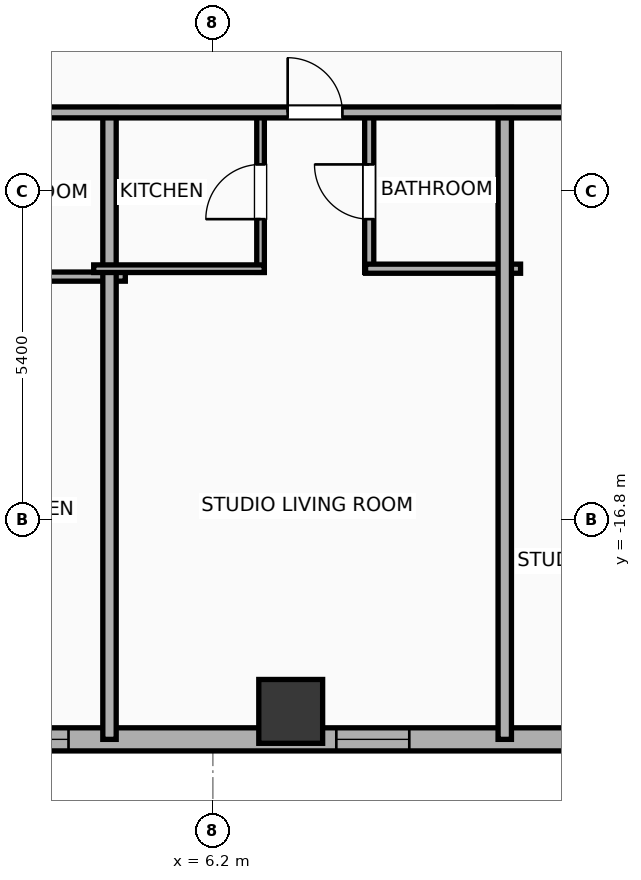
"""IFC4 building model, lengths in metres.
Left out: names, types, materials, properties, quantities, classifications, styles, units other than length and angle.
Written with IfcOpenShell. Run it as: python <this file> out.ifc"""

import sys

from ifc_helpers import new_model, si_unit, direction, frame, frame_2d, origin, origin_2d, place, context, subcontext, project, spatial, rectangle, hollow_rectangle, extrude, element, fill, save


model = new_model("IFC4")
c1 = context("Model", 3, precision=1e-05, world=origin(), true_north=direction((0.0, 1.0)))
c2 = subcontext(c1, "Body", "Model", "MODEL_VIEW")
j1 = project(units=[si_unit("LENGTHUNIT", "METRE"), si_unit("PLANEANGLEUNIT", "RADIAN")], contexts=[c1])
p1 = place(None, origin())
s1 = spatial("IfcSite", under=j1, at=p1, CompositionType="ELEMENT")
p2 = place(p1, origin())
s2 = spatial("IfcBuilding", under=s1, at=p2, CompositionType="ELEMENT")
p3 = place(p2, frame((0.0, 0.0, 128.7)))
s3 = spatial("IfcBuildingStorey", under=s2, at=p3, CompositionType="ELEMENT", Elevation=128.7)
p4 = place(p3, frame((7.48, -19.95, 0.0), z_axis=(0.0, 0.0, 1.0), x_axis=(1.0, 0.0, 0.0)))
e1 = element("IfcColumn", 1, at=p4, inside=s3, PredefinedType="COLUMN", context=c2, shape_type="SweptSolid", body=[
    extrude(hollow_rectangle(XDim=1.05, YDim=1.05, WallThickness=0.036, at=origin_2d()), origin(), (0.0, 0.0, 1.0), 3.9),
])
p5 = place(p3, frame((29.381, -20.41, 0.0), z_axis=(0.0, 0.0, 1.0), x_axis=(-1.0, 0.0, 0.0)))
e2 = element("IfcWall", 2, at=p5, inside=s3, PredefinedType="ELEMENTEDWALL", context=c2, shape_type="SweptSolid", body=[
    extrude(rectangle(XDim=54.763, YDim=0.38, at=frame_2d((27.381, 0.0))), origin(), (0.0, 0.0, 1.0), 3.65),
])
p6 = place(p5, frame((45.067, 0.0, 0.75)))
e3 = element("IfcOpeningElement", 3, at=p6, cuts=e2, PredefinedType="OPENING", context=c2, shape_type="SweptSolid", body=[
    extrude(rectangle(XDim=2.4, YDim=2.1, at=frame_2d((1.2, 1.05))), frame((0.0, 0.2, 0.0), z_axis=(0.0, -1.0, 0.0), x_axis=(1.0, 0.0, 0.0)), (0.0, 0.0, 1.0), 0.4),
])
p7 = place(p5, frame((51.777, 0.0, 0.75)))
e4 = element("IfcOpeningElement", 4, at=p7, cuts=e2, PredefinedType="OPENING", context=c2, shape_type="SweptSolid", body=[
    extrude(rectangle(XDim=1.2, YDim=2.05, at=frame_2d((0.6, 1.025))), frame((0.0, 0.2, 0.0), z_axis=(0.0, -1.0, 0.0), x_axis=(1.0, 0.0, 0.0)), (0.0, 0.0, 1.0), 0.4),
])
p8 = place(p5, frame((48.976, 0.0, 0.75)))
e5 = element("IfcOpeningElement", 5, at=p8, cuts=e2, PredefinedType="OPENING", context=c2, shape_type="SweptSolid", body=[
    extrude(rectangle(XDim=1.2, YDim=2.05, at=frame_2d((0.6, 1.025))), frame((0.0, 0.2, 0.0), z_axis=(0.0, -1.0, 0.0), x_axis=(1.0, 0.0, 0.0)), (0.0, 0.0, 1.0), 0.4),
])
p9 = place(p5, frame((40.531, 0.0, 0.75)))
e6 = element("IfcOpeningElement", 6, at=p9, cuts=e2, PredefinedType="OPENING", context=c2, shape_type="SweptSolid", body=[
    extrude(rectangle(XDim=1.2, YDim=2.05, at=frame_2d((0.6, 1.025))), frame((0.0, 0.2, 0.0), z_axis=(0.0, -1.0, 0.0), x_axis=(1.0, 0.0, 0.0)), (0.0, 0.0, 1.0), 0.4),
])
p10 = place(p5, frame((33.686, 0.0, 0.75)))
e7 = element("IfcOpeningElement", 7, at=p10, cuts=e2, PredefinedType="OPENING", context=c2, shape_type="SweptSolid", body=[
    extrude(rectangle(XDim=1.2, YDim=2.05, at=frame_2d((0.6, 1.025))), frame((0.0, 0.2, 0.0), z_axis=(0.0, -1.0, 0.0), x_axis=(1.0, 0.0, 0.0)), (0.0, 0.0, 1.0), 0.4),
])
p11 = place(p5, frame((35.976, 0.0, 0.75)))
e8 = element("IfcOpeningElement", 8, at=p11, cuts=e2, PredefinedType="OPENING", context=c2, shape_type="SweptSolid", body=[
    extrude(rectangle(XDim=1.2, YDim=2.05, at=frame_2d((0.6, 1.025))), frame((0.0, 0.2, 0.0), z_axis=(0.0, -1.0, 0.0), x_axis=(1.0, 0.0, 0.0)), (0.0, 0.0, 1.0), 0.4),
])
p12 = place(p5, frame((28.805, 0.0, 0.75)))
e9 = element("IfcOpeningElement", 9, at=p12, cuts=e2, PredefinedType="OPENING", context=c2, shape_type="SweptSolid", body=[
    extrude(rectangle(XDim=1.2, YDim=2.05, at=frame_2d((0.6, 1.025))), frame((0.0, 0.2, 0.0), z_axis=(0.0, -1.0, 0.0), x_axis=(1.0, 0.0, 0.0)), (0.0, 0.0, 1.0), 0.4),
])
p13 = place(p5, frame((25.555, 0.0, 0.75)))
e10 = element("IfcOpeningElement", 10, at=p13, cuts=e2, PredefinedType="OPENING", context=c2, shape_type="SweptSolid", body=[
    extrude(rectangle(XDim=1.2, YDim=2.05, at=frame_2d((0.6, 1.025))), frame((0.0, 0.2, 0.0), z_axis=(0.0, -1.0, 0.0), x_axis=(1.0, 0.0, 0.0)), (0.0, 0.0, 1.0), 0.4),
])
p14 = place(p5, frame((19.951, 0.0, 0.75)))
e11 = element("IfcOpeningElement", 11, at=p14, cuts=e2, PredefinedType="OPENING", context=c2, shape_type="SweptSolid", body=[
    extrude(rectangle(XDim=1.2, YDim=2.05, at=frame_2d((0.6, 1.025))), frame((0.0, 0.2, 0.0), z_axis=(0.0, -1.0, 0.0), x_axis=(1.0, 0.0, 0.0)), (0.0, 0.0, 1.0), 0.4),
])
p15 = place(p5, frame((15.836, 0.0, 0.75)))
e12 = element("IfcOpeningElement", 12, at=p15, cuts=e2, PredefinedType="OPENING", context=c2, shape_type="SweptSolid", body=[
    extrude(rectangle(XDim=1.2, YDim=2.05, at=frame_2d((0.6, 1.025))), frame((0.0, 0.2, 0.0), z_axis=(0.0, -1.0, 0.0), x_axis=(1.0, 0.0, 0.0)), (0.0, 0.0, 1.0), 0.4),
])
p16 = place(p5, frame((12.586, 0.0, 0.75)))
e13 = element("IfcOpeningElement", 13, at=p16, cuts=e2, PredefinedType="OPENING", context=c2, shape_type="SweptSolid", body=[
    extrude(rectangle(XDim=1.2, YDim=2.05, at=frame_2d((0.6, 1.025))), frame((0.0, 0.2, 0.0), z_axis=(0.0, -1.0, 0.0), x_axis=(1.0, 0.0, 0.0)), (0.0, 0.0, 1.0), 0.4),
])
p17 = place(p5, frame((9.011, 0.0, 0.75)))
e14 = element("IfcOpeningElement", 14, at=p17, cuts=e2, PredefinedType="OPENING", context=c2, shape_type="SweptSolid", body=[
    extrude(rectangle(XDim=1.2, YDim=2.05, at=frame_2d((0.6, 1.025))), frame((0.0, 0.2, 0.0), z_axis=(0.0, -1.0, 0.0), x_axis=(1.0, 0.0, 0.0)), (0.0, 0.0, 1.0), 0.4),
])
p18 = place(p5, frame((6.001, 0.0, 0.75)))
e15 = element("IfcOpeningElement", 15, at=p18, cuts=e2, PredefinedType="OPENING", context=c2, shape_type="SweptSolid", body=[
    extrude(rectangle(XDim=1.2, YDim=2.05, at=frame_2d((0.6, 1.025))), frame((0.0, 0.2, 0.0), z_axis=(0.0, -1.0, 0.0), x_axis=(1.0, 0.0, 0.0)), (0.0, 0.0, 1.0), 0.4),
])
p19 = place(p5, frame((2.536, 0.0, 0.75)))
e16 = element("IfcOpeningElement", 16, at=p19, cuts=e2, PredefinedType="OPENING", context=c2, shape_type="SweptSolid", body=[
    extrude(rectangle(XDim=1.2, YDim=2.05, at=frame_2d((0.6, 1.025))), frame((0.0, 0.2, 0.0), z_axis=(0.0, -1.0, 0.0), x_axis=(1.0, 0.0, 0.0)), (0.0, 0.0, 1.0), 0.4),
])
p20 = place(p3, frame((1.872, -12.8, 0.0), z_axis=(0.0, 0.0, 1.0), x_axis=(1.0, 0.0, 0.0)))
e17 = element("IfcWall", 17, at=p20, inside=s3, PredefinedType="PLUMBINGWALL", context=c2, shape_type="SweptSolid", body=[
    extrude(rectangle(XDim=2.888, YDim=0.15, at=frame_2d((1.444, 0.0))), origin(), (0.0, 0.0, 1.0), 3.65),
])
p21 = place(p3, frame((4.5, -20.41, 0.0), z_axis=(0.0, 0.0, 1.0), x_axis=(0.0, 1.0, 0.0)))
e18 = element("IfcWall", 18, at=p21, inside=s3, PredefinedType="PARTITIONING", context=c2, shape_type="SweptSolid", body=[
    extrude(rectangle(XDim=10.39, YDim=0.22, at=frame_2d((5.195, 0.0))), origin(), (0.0, 0.0, 1.0), 3.65),
])
p22 = place(p3, frame((6.984, -12.73, 0.0), z_axis=(0.0, 0.0, 1.0), x_axis=(0.0, 1.0, 0.0)))
e19 = element("IfcWall", 19, at=p22, inside=s3, PredefinedType="PARTITIONING", context=c2, shape_type="SweptSolid", body=[
    extrude(rectangle(XDim=2.65, YDim=0.125, at=frame_2d((1.325, 0.0))), origin(), (0.0, 0.0, 1.0), 3.65),
])
p23 = place(p22, frame((0.875, 0.0, 0.0)))
e20 = element("IfcOpeningElement", 20, at=p23, cuts=e19, PredefinedType="OPENING", context=c2, shape_type="SweptSolid", body=[
    extrude(rectangle(XDim=0.9, YDim=2.05, at=frame_2d((0.45, 1.025))), frame((0.0, 0.073, 0.0), z_axis=(0.0, -1.0, 0.0), x_axis=(1.0, 0.0, 0.0)), (0.0, 0.0, 1.0), 0.145),
])
p24 = place(p3, frame((8.771, -12.73, 0.0), z_axis=(0.0, 0.0, 1.0), x_axis=(0.0, 1.0, 0.0)))
e21 = element("IfcWall", 21, at=p24, inside=s3, PredefinedType="PLUMBINGWALL", context=c2, shape_type="SweptSolid", body=[
    extrude(rectangle(XDim=2.65, YDim=0.15, at=frame_2d((1.325, 0.0))), origin(), (0.0, 0.0, 1.0), 3.65),
])
p25 = place(p24, frame((0.875, 0.0, 0.0)))
e22 = element("IfcOpeningElement", 22, at=p25, cuts=e21, PredefinedType="OPENING", context=c2, shape_type="SweptSolid", body=[
    extrude(rectangle(XDim=0.9, YDim=2.05, at=frame_2d((0.45, 1.025))), frame((0.0, 0.085, 0.0), z_axis=(0.0, -1.0, 0.0), x_axis=(1.0, 0.0, 0.0)), (0.0, 0.0, 1.0), 0.17),
])
p26 = place(p3, frame((4.24, -12.67, 0.0), z_axis=(0.0, 0.0, 1.0), x_axis=(1.0, 0.0, 0.0)))
e23 = element("IfcWall", 23, at=p26, inside=s3, PredefinedType="PARTITIONING", context=c2, shape_type="SweptSolid", body=[
    extrude(rectangle(XDim=2.804, YDim=0.125, at=frame_2d((1.402, 0.0))), origin(), (0.0, 0.0, 1.0), 3.65),
])
p27 = place(p3, frame((8.711, -12.67, 0.0), z_axis=(0.0, 0.0, 1.0), x_axis=(1.0, 0.0, 0.0)))
e24 = element("IfcWall", 24, at=p27, inside=s3, PredefinedType="PLUMBINGWALL", context=c2, shape_type="SweptSolid", body=[
    extrude(rectangle(XDim=2.549, YDim=0.15, at=frame_2d((1.274, 0.0))), origin(), (0.0, 0.0, 1.0), 3.65),
])
p28 = place(p3, frame((11.0, -20.41, 0.0), z_axis=(0.0, 0.0, 1.0), x_axis=(0.0, 1.0, 0.0)))
e25 = element("IfcWall", 25, at=p28, inside=s3, PredefinedType="PARTITIONING", context=c2, shape_type="SweptSolid", body=[
    extrude(rectangle(XDim=10.39, YDim=0.22, at=frame_2d((5.195, 0.0))), origin(), (0.0, 0.0, 1.0), 3.65),
])
p29 = place(p3, frame((-29.21, -10.1, 0.0), z_axis=(0.0, 0.0, 1.0), x_axis=(1.0, 0.0, 0.0)))
e26 = element("IfcWall", 26, at=p29, inside=s3, PredefinedType="PARTITIONING", context=c2, shape_type="SweptSolid", body=[
    extrude(rectangle(XDim=62.42, YDim=0.18, at=frame_2d((31.21, 0.0))), origin(), (0.0, 0.0, 1.0), 3.65),
])
p30 = place(p29, frame((3.414, 0.0, 0.0)))
e27 = element("IfcOpeningElement", 27, at=p30, cuts=e26, PredefinedType="OPENING", context=c2, shape_type="SweptSolid", body=[
    extrude(rectangle(XDim=1.15, YDim=2.05, at=frame_2d((0.575, 1.025))), frame((0.0, 0.1, 0.0), z_axis=(0.0, -1.0, 0.0), x_axis=(1.0, 0.0, 0.0)), (0.0, 0.0, 1.0), 0.2),
])
p31 = place(p29, frame((11.659, 0.0, 0.0)))
e28 = element("IfcOpeningElement", 28, at=p31, cuts=e26, PredefinedType="OPENING", context=c2, shape_type="SweptSolid", body=[
    extrude(rectangle(XDim=1.15, YDim=2.05, at=frame_2d((0.575, 1.025))), frame((0.0, 0.1, 0.0), z_axis=(0.0, -1.0, 0.0), x_axis=(1.0, 0.0, 0.0)), (0.0, 0.0, 1.0), 0.2),
])
p32 = place(p29, frame((17.14, 0.0, 0.0)))
e29 = element("IfcOpeningElement", 29, at=p32, cuts=e26, PredefinedType="OPENING", context=c2, shape_type="SweptSolid", body=[
    extrude(rectangle(XDim=0.9, YDim=2.05, at=frame_2d((0.45, 1.025))), frame((0.0, 0.1, 0.0), z_axis=(0.0, -1.0, 0.0), x_axis=(1.0, 0.0, 0.0)), (0.0, 0.0, 1.0), 0.2),
])
p33 = place(p29, frame((24.661, 0.0, 0.0)))
e30 = element("IfcOpeningElement", 30, at=p33, cuts=e26, PredefinedType="OPENING", context=c2, shape_type="SweptSolid", body=[
    extrude(rectangle(XDim=1.15, YDim=2.05, at=frame_2d((0.575, 1.025))), frame((0.0, 0.1, 0.0), z_axis=(0.0, -1.0, 0.0), x_axis=(1.0, 0.0, 0.0)), (0.0, 0.0, 1.0), 0.2),
])
p34 = place(p29, frame((28.644, 0.0, 0.0)))
e31 = element("IfcOpeningElement", 31, at=p34, cuts=e26, PredefinedType="OPENING", context=c2, shape_type="SweptSolid", body=[
    extrude(rectangle(XDim=1.15, YDim=2.05, at=frame_2d((0.575, 1.025))), frame((0.0, 0.1, 0.0), z_axis=(0.0, -1.0, 0.0), x_axis=(1.0, 0.0, 0.0)), (0.0, 0.0, 1.0), 0.2),
])
p35 = place(p29, frame((36.64, 0.0, 0.0)))
e32 = element("IfcOpeningElement", 32, at=p35, cuts=e26, PredefinedType="OPENING", context=c2, shape_type="SweptSolid", body=[
    extrude(rectangle(XDim=0.9, YDim=2.05, at=frame_2d((0.45, 1.025))), frame((0.0, 0.1, 0.0), z_axis=(0.0, -1.0, 0.0), x_axis=(1.0, 0.0, 0.0)), (0.0, 0.0, 1.0), 0.2),
])
p36 = place(p29, frame((41.608, 0.0, 0.0)))
e33 = element("IfcOpeningElement", 33, at=p36, cuts=e26, PredefinedType="OPENING", context=c2, shape_type="SweptSolid", body=[
    extrude(rectangle(XDim=1.15, YDim=2.05, at=frame_2d((0.575, 1.025))), frame((0.0, 0.1, 0.0), z_axis=(0.0, -1.0, 0.0), x_axis=(1.0, 0.0, 0.0)), (0.0, 0.0, 1.0), 0.2),
])
p37 = place(p29, frame((48.194, 0.0, 0.0)))
e34 = element("IfcOpeningElement", 34, at=p37, cuts=e26, PredefinedType="OPENING", context=c2, shape_type="SweptSolid", body=[
    extrude(rectangle(XDim=1.15, YDim=2.05, at=frame_2d((0.575, 1.025))), frame((0.0, 0.1, 0.0), z_axis=(0.0, -1.0, 0.0), x_axis=(1.0, 0.0, 0.0)), (0.0, 0.0, 1.0), 0.2),
])
p38 = place(p29, frame((57.525, 0.0, 0.0)))
e35 = element("IfcOpeningElement", 35, at=p38, cuts=e26, PredefinedType="OPENING", context=c2, shape_type="SweptSolid", body=[
    extrude(rectangle(XDim=1.15, YDim=2.05, at=frame_2d((0.575, 1.025))), frame((0.0, 0.1, 0.0), z_axis=(0.0, -1.0, 0.0), x_axis=(1.0, 0.0, 0.0)), (0.0, 0.0, 1.0), 0.2),
])
p39 = place(p13, origin())
e36 = element("IfcWindow", 36, at=p39, inside=s3, PartitioningType="SINGLE_PANEL", PredefinedType="WINDOW", context=c2, shape_type="SweptSolid", body=[
    extrude(rectangle(XDim=1.2, YDim=2.05, at=frame_2d((0.6, 1.025))), frame((0.0, 0.03, 0.0), z_axis=(0.0, -1.0, 0.0), x_axis=(1.0, 0.0, 0.0)), (0.0, 0.0, 1.0), 0.06),
])
fill(e10, e36)
p40 = place(p14, origin())
e37 = element("IfcWindow", 37, at=p40, inside=s3, PartitioningType="SINGLE_PANEL", PredefinedType="WINDOW", context=c2, shape_type="SweptSolid", body=[
    extrude(rectangle(XDim=1.2, YDim=2.05, at=frame_2d((0.6, 1.025))), frame((0.0, 0.03, 0.0), z_axis=(0.0, -1.0, 0.0), x_axis=(1.0, 0.0, 0.0)), (0.0, 0.0, 1.0), 0.06),
])
fill(e11, e37)
p41 = place(p23, origin())
e38 = element("IfcDoor", 38, at=p41, inside=s3, OperationType="SINGLE_SWING_LEFT", PredefinedType="DOOR", context=c2, shape_type="SweptSolid", body=[
    extrude(rectangle(XDim=0.9, YDim=2.05, at=frame_2d((0.45, 1.025))), frame((0.0, 0.025, 0.0), z_axis=(0.0, -1.0, 0.0), x_axis=(1.0, 0.0, 0.0)), (0.0, 0.0, 1.0), 0.05),
])
fill(e20, e38)
p42 = place(p25, origin())
e39 = element("IfcDoor", 39, at=p42, inside=s3, OperationType="SINGLE_SWING_RIGHT", PredefinedType="DOOR", context=c2, shape_type="SweptSolid", body=[
    extrude(rectangle(XDim=0.9, YDim=2.05, at=frame_2d((0.45, 1.025))), frame((0.0, 0.025, 0.0), z_axis=(0.0, -1.0, 0.0), x_axis=(1.0, 0.0, 0.0)), (0.0, 0.0, 1.0), 0.05),
])
fill(e22, e39)
p43 = place(p35, origin())
e40 = element("IfcDoor", 40, at=p43, inside=s3, OperationType="SINGLE_SWING_LEFT", PredefinedType="DOOR", context=c2, shape_type="SweptSolid", body=[
    extrude(rectangle(XDim=0.9, YDim=2.05, at=frame_2d((0.45, 1.025))), frame((0.0, 0.025, 0.0), z_axis=(0.0, -1.0, 0.0), x_axis=(1.0, 0.0, 0.0)), (0.0, 0.0, 1.0), 0.05),
])
fill(e32, e40)
save(model, sys.argv[1])
